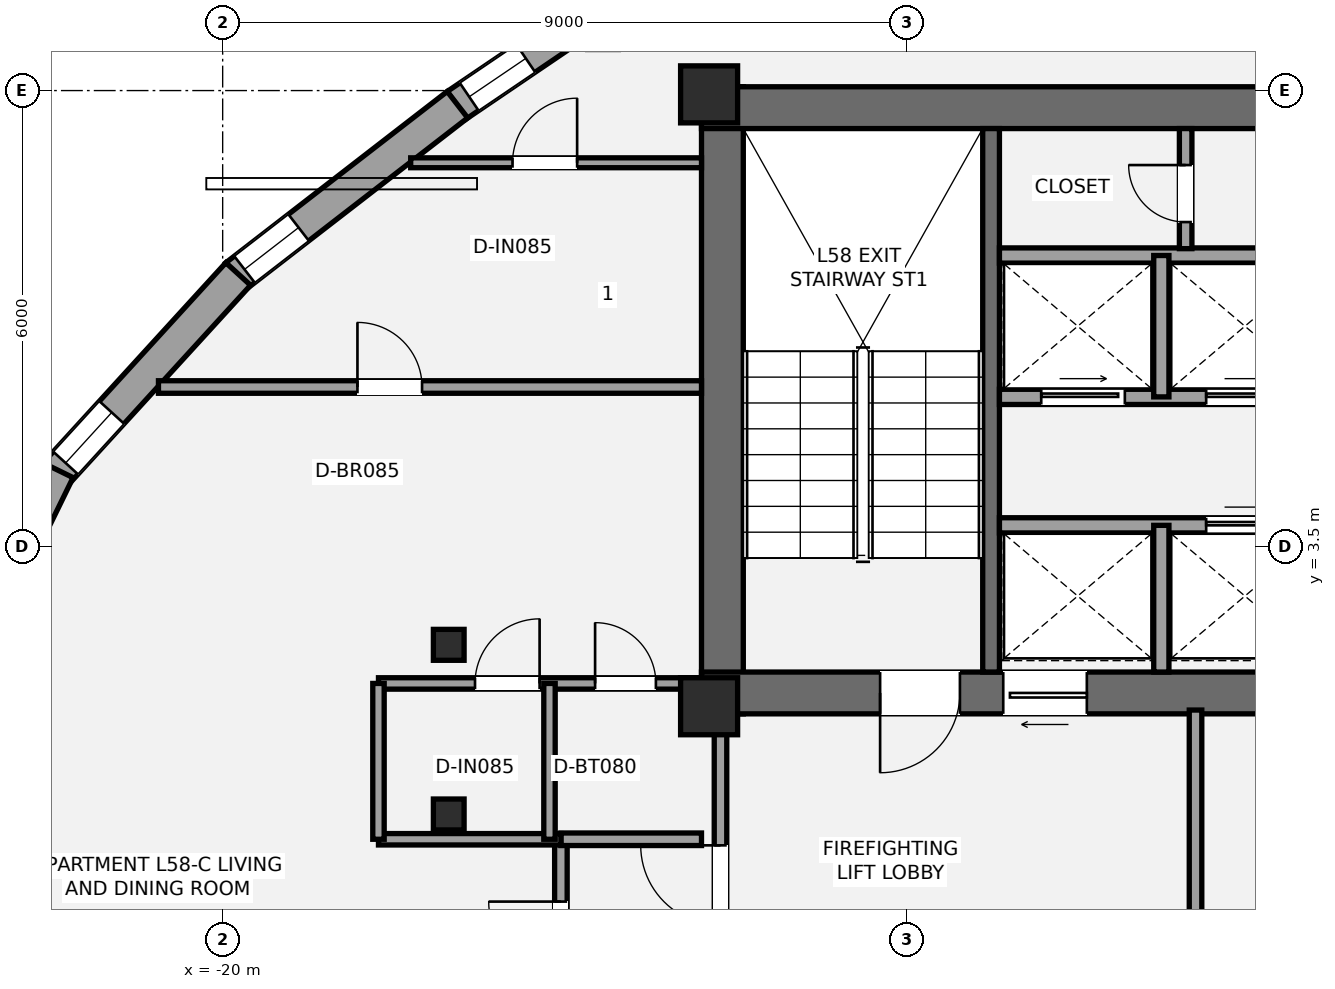
"""IFC4 building model, lengths in metres.
Left out: names, types, materials, properties, quantities, classifications, styles, units other than length and angle.
Written with IfcOpenShell. Run it as: python <this file> out.ifc"""

import sys

from ifc_helpers import new_model, si_unit, direction, frame, frame_2d, origin, origin_2d, place, context, subcontext, project, spatial, rectangle, i_section, extrude, element, fill, save


model = new_model("IFC4")
c1 = context("Model", 3, precision=1e-05, world=origin(), true_north=direction((0.0, 1.0)))
c2 = subcontext(c1, "Body", "Model", "MODEL_VIEW")
j1 = project(units=[si_unit("LENGTHUNIT", "METRE"), si_unit("PLANEANGLEUNIT", "RADIAN")], contexts=[c1])
p1 = place(None, origin())
s1 = spatial("IfcSite", under=j1, at=p1, CompositionType="ELEMENT")
p2 = place(p1, origin())
s2 = spatial("IfcBuilding", under=s1, at=p2, CompositionType="ELEMENT")
p3 = place(p2, frame((0.0, 0.0, 210.0)))
s3 = spatial("IfcBuildingStorey", under=s2, at=p3, CompositionType="ELEMENT", Elevation=210.0)
p4 = place(p3, frame((-13.425, 1.3, 0.0), z_axis=(0.0, 0.0, 1.0), x_axis=(0.0, 1.0, 0.0)))
e1 = element("IfcWall", 1, at=p4, inside=s3, PredefinedType="SHEAR", context=c2, shape_type="SweptSolid", body=[
    extrude(rectangle(XDim=8.25, YDim=0.55, at=frame_2d((4.125, 0.0))), origin(), (0.0, 0.0, 1.0), 3.15),
])
p5 = place(p3, frame((-13.7, 9.275, 0.0), z_axis=(0.0, 0.0, 1.0), x_axis=(1.0, 0.0, 0.0)))
e2 = element("IfcWall", 2, at=p5, inside=s3, PredefinedType="SHEAR", context=c2, shape_type="SweptSolid", body=[
    extrude(rectangle(XDim=9.175, YDim=0.55, at=frame_2d((4.587, 0.0))), origin(), (0.0, 0.0, 1.0), 3.15),
])
p6 = place(p3, frame((-4.925, 1.575, 0.0), z_axis=(0.0, 0.0, 1.0), x_axis=(-1.0, 0.0, 0.0)))
e3 = element("IfcWall", 3, at=p6, inside=s3, PredefinedType="SHEAR", context=c2, shape_type="SweptSolid", body=[
    extrude(rectangle(XDim=8.775, YDim=0.55, at=frame_2d((4.387, 0.0))), origin(), (0.0, 0.0, 1.0), 3.15),
])
p7 = place(p6, frame((5.375, 0.0, 0.0)))
e4 = element("IfcOpeningElement", 4, at=p7, cuts=e3, PredefinedType="OPENING", context=c2, shape_type="SweptSolid", body=[
    extrude(rectangle(XDim=1.05, YDim=2.15, at=frame_2d((0.525, 1.075))), frame((0.0, 0.285, 0.0), z_axis=(0.0, -1.0, 0.0), x_axis=(1.0, 0.0, 0.0)), (0.0, 0.0, 1.0), 0.57),
])
p8 = place(p6, frame((3.705, 0.0, 0.0)))
e5 = element("IfcOpeningElement", 5, at=p8, cuts=e3, PredefinedType="OPENING", context=c2, shape_type="SweptSolid", body=[
    extrude(rectangle(XDim=1.1, YDim=2.2, at=frame_2d((0.55, 1.1))), frame((0.0, 0.285, 0.0), z_axis=(0.0, -1.0, 0.0), x_axis=(1.0, 0.0, 0.0)), (0.0, 0.0, 1.0), 0.57),
])
p9 = place(p3, frame((-9.89, 1.85, 0.0), z_axis=(0.0, 0.0, 1.0), x_axis=(0.0, 1.0, 0.0)))
e6 = element("IfcWall", 6, at=p9, inside=s3, PredefinedType="SHEAR", context=c2, shape_type="SweptSolid", body=[
    extrude(rectangle(XDim=7.15, YDim=0.22, at=frame_2d((3.575, 0.0))), origin(), (0.0, 0.0, 1.0), 3.15),
])
for number, where, z_axis, x_axis in (
    (7, (-13.6, 1.4, 0.0), (0.0, 0.0, 1.0), (1.0, 0.0, 0.0)),
    (8, (-13.6, 9.45, 0.0), (0.0, 0.0, 1.0), (1.0, 0.0, 0.0)),
):
    element("IfcColumn", number, at=place(p3, frame(where, z_axis=z_axis, x_axis=x_axis)), inside=s3, PredefinedType="PILASTER", context=c2, shape_type="SweptSolid", body=[
        extrude(rectangle(XDim=0.75, YDim=0.75, at=origin_2d()), origin(), (0.0, 0.0, 1.0), 3.15),
    ])
for number, where, z_axis, x_axis in (
    (9, (-17.026, 2.208, 0.0), (0.0, 0.0, 1.0), (1.0, 0.0, 0.0)),
    (10, (-17.026, -0.024, 0.0), (0.0, 0.0, 1.0), (1.0, 0.0, 0.0)),
):
    element("IfcColumn", number, at=place(p3, frame(where, z_axis=z_axis, x_axis=x_axis)), inside=s3, PredefinedType="COLUMN", context=c2, shape_type="SweptSolid", body=[
        extrude(i_section(OverallWidth=0.404, OverallDepth=0.407, WebThickness=0.027, FlangeThickness=0.044, at=origin_2d()), origin(), (0.0, 0.0, 1.0), 3.15),
    ])
p10 = place(p3, frame((-16.922, 9.306, 0.0), z_axis=(0.0, 0.0, 1.0), x_axis=(0.827589832786, 0.561333295529, 0.0)))
e11 = element("IfcWall", 11, at=p10, inside=s3, PredefinedType="STANDARD", context=c2, shape_type="SweptSolid", body=[
    extrude(rectangle(XDim=3.693, YDim=0.44, at=frame_2d((1.847, 0.0))), origin(), (0.0, 0.0, 1.0), 2.336),
])
p11 = place(p10, frame((0.2, 0.0, 0.42)))
e12 = element("IfcOpeningElement", 12, at=p11, cuts=e11, PredefinedType="OPENING", context=c2, shape_type="SweptSolid", body=[
    extrude(rectangle(XDim=0.9, YDim=1.35, at=frame_2d((0.45, 0.675))), frame((0.0, 0.23, 0.0), z_axis=(0.0, -1.0, 0.0), x_axis=(1.0, 0.0, 0.0)), (0.0, 0.0, 1.0), 0.46),
])
p12 = place(p3, frame((-19.823, 7.062, 0.0), z_axis=(0.0, 0.0, 1.0), x_axis=(0.791016617957, 0.61179466336, 0.0)))
e13 = element("IfcWall", 13, at=p12, inside=s3, PredefinedType="STANDARD", context=c2, shape_type="SweptSolid", body=[
    extrude(rectangle(XDim=3.682, YDim=0.44, at=frame_2d((1.841, 0.0))), origin(), (0.0, 0.0, 1.0), 2.336),
])
p13 = place(p12, frame((0.14, 0.0, 0.58)))
e14 = element("IfcOpeningElement", 14, at=p13, cuts=e13, PredefinedType="OPENING", context=c2, shape_type="SweptSolid", body=[
    extrude(rectangle(XDim=0.9, YDim=1.35, at=frame_2d((0.45, 0.675))), frame((0.0, 0.23, 0.0), z_axis=(0.0, -1.0, 0.0), x_axis=(1.0, 0.0, 0.0)), (0.0, 0.0, 1.0), 0.46),
])
p14 = place(p3, frame((-22.201, 4.453, 0.0), z_axis=(0.0, 0.0, 1.0), x_axis=(0.674353738675, 0.738408447362, 0.0)))
e15 = element("IfcWall", 15, at=p14, inside=s3, PredefinedType="STANDARD", context=c2, shape_type="SweptSolid", body=[
    extrude(rectangle(XDim=3.568, YDim=0.44, at=frame_2d((1.784, 0.0))), origin(), (0.0, 0.0, 1.0), 2.336),
])
p15 = place(p14, frame((0.2, 0.0, 0.42)))
e16 = element("IfcOpeningElement", 16, at=p15, cuts=e15, PredefinedType="OPENING", context=c2, shape_type="SweptSolid", body=[
    extrude(rectangle(XDim=0.9, YDim=1.35, at=frame_2d((0.45, 0.675))), frame((0.0, 0.23, 0.0), z_axis=(0.0, -1.0, 0.0), x_axis=(1.0, 0.0, 0.0)), (0.0, 0.0, 1.0), 0.46),
])
p16 = place(p3, frame((-23.636, 1.496, 0.0), z_axis=(0.0, 0.0, 1.0), x_axis=(0.439000922584, 0.898486610902, 0.0)))
e17 = element("IfcWall", 17, at=p16, inside=s3, PredefinedType="STANDARD", context=c2, shape_type="SweptSolid", body=[
    extrude(rectangle(XDim=3.349, YDim=0.44, at=frame_2d((1.675, 0.0))), origin(), (0.0, 0.0, 1.0), 2.336),
])
p17 = place(p3, frame((-13.45, -2.15, 0.0), z_axis=(0.0, 0.0, 1.0), x_axis=(0.0, 1.0, 0.0)))
e18 = element("IfcWall", 18, at=p17, inside=s3, PredefinedType="PARTITIONING", context=c2, shape_type="SweptSolid", body=[
    extrude(rectangle(XDim=3.5, YDim=0.165, at=frame_2d((1.75, 0.0))), origin(), (0.0, 0.0, 1.0), 2.423),
])
p18 = place(p17, frame((0.67, 0.0, 0.0)))
e19 = element("IfcOpeningElement", 19, at=p18, cuts=e18, PredefinedType="OPENING", context=c2, shape_type="SweptSolid", body=[
    extrude(rectangle(XDim=1.05, YDim=2.15, at=frame_2d((0.525, 1.075))), frame((0.0, 0.093, 0.0), z_axis=(0.0, -1.0, 0.0), x_axis=(1.0, 0.0, 0.0)), (0.0, 0.0, 1.0), 0.185),
])
p19 = place(p3, frame((-7.2, -2.15, 0.0), z_axis=(0.0, 0.0, 1.0), x_axis=(0.0, 1.0, 0.0)))
e20 = element("IfcWall", 20, at=p19, inside=s3, PredefinedType="PARTITIONING", context=c2, shape_type="SweptSolid", body=[
    extrude(rectangle(XDim=3.5, YDim=0.165, at=frame_2d((1.75, 0.0))), origin(), (0.0, 0.0, 1.0), 2.423),
])
p20 = place(p3, frame((-9.78, 3.78, 0.0), z_axis=(0.0, 0.0, 1.0), x_axis=(1.0, 0.0, 0.0)))
e21 = element("IfcWall", 21, at=p20, inside=s3, PredefinedType="SOLIDWALL", context=c2, shape_type="SweptSolid", body=[
    extrude(rectangle(XDim=4.305, YDim=0.2, at=frame_2d((2.152, 0.0))), origin(), (0.0, 0.0, 1.0), 2.97),
])
p21 = place(p20, frame((2.72, 0.0, 0.0)))
e22 = element("IfcOpeningElement", 22, at=p21, cuts=e21, PredefinedType="OPENING", context=c2, shape_type="SweptSolid", body=[
    extrude(rectangle(XDim=1.1, YDim=2.2, at=frame_2d((0.55, 1.1))), frame((0.0, 0.11, 0.0), z_axis=(0.0, -1.0, 0.0), x_axis=(1.0, 0.0, 0.0)), (0.0, 0.0, 1.0), 0.22),
])
p22 = place(p3, frame((-7.65, 1.85, 0.0), z_axis=(0.0, 0.0, 1.0), x_axis=(0.0, 1.0, 0.0)))
e23 = element("IfcWall", 23, at=p22, inside=s3, PredefinedType="SOLIDWALL", context=c2, shape_type="SweptSolid", body=[
    extrude(rectangle(XDim=1.93, YDim=0.2, at=frame_2d((0.965, 0.0))), origin(), (0.0, 0.0, 1.0), 2.97),
])
p23 = place(p3, frame((-9.78, 5.47, 0.0), z_axis=(0.0, 0.0, 1.0), x_axis=(1.0, 0.0, 0.0)))
e24 = element("IfcWall", 24, at=p23, inside=s3, PredefinedType="SOLIDWALL", context=c2, shape_type="SweptSolid", body=[
    extrude(rectangle(XDim=4.305, YDim=0.2, at=frame_2d((2.152, 0.0))), origin(), (0.0, 0.0, 1.0), 2.97),
])
p24 = place(p23, frame((0.55, 0.0, 0.0)))
e25 = element("IfcOpeningElement", 25, at=p24, cuts=e24, PredefinedType="OPENING", context=c2, shape_type="SweptSolid", body=[
    extrude(rectangle(XDim=1.1, YDim=2.2, at=frame_2d((0.55, 1.1))), frame((0.0, 0.11, 0.0), z_axis=(0.0, -1.0, 0.0), x_axis=(1.0, 0.0, 0.0)), (0.0, 0.0, 1.0), 0.22),
])
p25 = place(p23, frame((2.72, 0.0, 0.0)))
e26 = element("IfcOpeningElement", 26, at=p25, cuts=e24, PredefinedType="OPENING", context=c2, shape_type="SweptSolid", body=[
    extrude(rectangle(XDim=1.1, YDim=2.2, at=frame_2d((0.55, 1.1))), frame((0.0, 0.11, 0.0), z_axis=(0.0, -1.0, 0.0), x_axis=(1.0, 0.0, 0.0)), (0.0, 0.0, 1.0), 0.22),
])
p26 = place(p3, frame((-9.78, 7.33, 0.0), z_axis=(0.0, 0.0, 1.0), x_axis=(1.0, 0.0, 0.0)))
e27 = element("IfcWall", 27, at=p26, inside=s3, PredefinedType="SOLIDWALL", context=c2, shape_type="SweptSolid", body=[
    extrude(rectangle(XDim=4.305, YDim=0.2, at=frame_2d((2.152, 0.0))), origin(), (0.0, 0.0, 1.0), 2.97),
])
p27 = place(p3, frame((-7.65, 5.47, 0.0), z_axis=(0.0, 0.0, 1.0), x_axis=(0.0, 1.0, 0.0)))
e28 = element("IfcWall", 28, at=p27, inside=s3, PredefinedType="SOLIDWALL", context=c2, shape_type="SweptSolid", body=[
    extrude(rectangle(XDim=1.86, YDim=0.2, at=frame_2d((0.93, 0.0))), origin(), (0.0, 0.0, 1.0), 2.97),
])
p28 = place(p3, frame((-7.33, 7.42, 0.0), z_axis=(0.0, 0.0, 1.0), x_axis=(0.0, 1.0, 0.0)))
e29 = element("IfcWall", 29, at=p28, inside=s3, PredefinedType="PARTITIONING", context=c2, shape_type="SweptSolid", body=[
    extrude(rectangle(XDim=1.58, YDim=0.165, at=frame_2d((0.79, 0.0))), origin(), (0.0, 0.0, 1.0), 2.97),
])
p29 = place(p28, frame((0.35, 0.0, 0.0)))
e30 = element("IfcOpeningElement", 30, at=p29, cuts=e29, PredefinedType="OPENING", context=c2, shape_type="SweptSolid", body=[
    extrude(rectangle(XDim=0.75, YDim=2.1, at=frame_2d((0.375, 1.05))), frame((0.0, 0.093, 0.0), z_axis=(0.0, -1.0, 0.0), x_axis=(1.0, 0.0, 0.0)), (0.0, 0.0, 1.0), 0.185),
])
p30 = place(p3, frame((-15.55, -3.95, 0.0), z_axis=(0.0, 0.0, 1.0), x_axis=(0.0, 1.0, 0.0)))
e31 = element("IfcWall", 31, at=p30, inside=s3, PredefinedType="PARTITIONING", context=c2, shape_type="SweptSolid", body=[
    extrude(rectangle(XDim=3.6, YDim=0.165, at=frame_2d((1.8, 0.0))), origin(), (0.0, 0.0, 1.0), 2.357),
])
p31 = place(p30, frame((1.83, 0.0, 0.0)))
e32 = element("IfcOpeningElement", 32, at=p31, cuts=e31, PredefinedType="OPENING", context=c2, shape_type="SweptSolid", body=[
    extrude(rectangle(XDim=0.95, YDim=2.15, at=frame_2d((0.475, 1.075))), frame((0.0, 0.093, 0.0), z_axis=(0.0, -1.0, 0.0), x_axis=(1.0, 0.0, 0.0)), (0.0, 0.0, 1.0), 0.185),
])
p32 = place(p3, frame((-15.55, -0.35, 0.0), z_axis=(0.0, 0.0, 1.0), x_axis=(1.0, 0.0, 0.0)))
e33 = element("IfcWall", 33, at=p32, inside=s3, PredefinedType="PARTITIONING", context=c2, shape_type="SweptSolid", body=[
    extrude(rectangle(XDim=1.85, YDim=0.165, at=frame_2d((0.925, 0.0))), origin(), (0.0, 0.0, 1.0), 2.97),
])
p33 = place(p3, frame((-20.845, 5.6, 0.0), z_axis=(0.0, 0.0, 1.0), x_axis=(1.0, 0.0, 0.0)))
e34 = element("IfcWall", 34, at=p33, inside=s3, PredefinedType="PARTITIONING", context=c2, shape_type="SweptSolid", body=[
    extrude(rectangle(XDim=7.145, YDim=0.165, at=frame_2d((3.572, 0.0))), origin(), (0.0, 0.0, 1.0), 2.423),
])
p34 = place(p33, frame((2.618, 0.0, 0.0)))
e35 = element("IfcOpeningElement", 35, at=p34, cuts=e34, PredefinedType="OPENING", context=c2, shape_type="SweptSolid", body=[
    extrude(rectangle(XDim=0.85, YDim=2.1, at=frame_2d((0.425, 1.05))), frame((0.0, 0.093, 0.0), z_axis=(0.0, -1.0, 0.0), x_axis=(1.0, 0.0, 0.0)), (0.0, 0.0, 1.0), 0.185),
])
p35 = place(p3, frame((-17.95, 1.7, 0.0), z_axis=(0.0, 0.0, 1.0), x_axis=(1.0, 0.0, 0.0)))
e36 = element("IfcWall", 36, at=p35, inside=s3, PredefinedType="PLUMBINGWALL", context=c2, shape_type="SweptSolid", body=[
    extrude(rectangle(XDim=4.25, YDim=0.15, at=frame_2d((2.125, 0.0))), origin(), (0.0, 0.0, 1.0), 2.423),
])
p36 = place(p35, frame((2.85, 0.0, 0.0)))
e37 = element("IfcOpeningElement", 37, at=p36, cuts=e36, PredefinedType="OPENING", context=c2, shape_type="SweptSolid", body=[
    extrude(rectangle(XDim=0.8, YDim=2.1, at=frame_2d((0.4, 1.05))), frame((0.0, 0.085, 0.0), z_axis=(0.0, -1.0, 0.0), x_axis=(1.0, 0.0, 0.0)), (0.0, 0.0, 1.0), 0.17),
])
p37 = place(p35, frame((1.27, 0.0, 0.0)))
e38 = element("IfcOpeningElement", 38, at=p37, cuts=e36, PredefinedType="OPENING", context=c2, shape_type="SweptSolid", body=[
    extrude(rectangle(XDim=0.85, YDim=2.1, at=frame_2d((0.425, 1.05))), frame((0.0, 0.085, 0.0), z_axis=(0.0, -1.0, 0.0), x_axis=(1.0, 0.0, 0.0)), (0.0, 0.0, 1.0), 0.17),
])
p38 = place(p3, frame((-17.95, -0.35, 0.0), z_axis=(0.0, 0.0, 1.0), x_axis=(1.0, 0.0, 0.0)))
e39 = element("IfcWall", 39, at=p38, inside=s3, PredefinedType="PLUMBINGWALL", context=c2, shape_type="SweptSolid", body=[
    extrude(rectangle(XDim=2.4, YDim=0.15, at=frame_2d((1.2, 0.0))), origin(), (0.0, 0.0, 1.0), 2.423),
])
p39 = place(p3, frame((-15.7, -0.35, 0.0), z_axis=(0.0, 0.0, 1.0), x_axis=(0.0, 1.0, 0.0)))
e40 = element("IfcWall", 40, at=p39, inside=s3, PredefinedType="PLUMBINGWALL", context=c2, shape_type="SweptSolid", body=[
    extrude(rectangle(XDim=2.05, YDim=0.15, at=frame_2d((1.025, 0.0))), origin(), (0.0, 0.0, 1.0), 2.97),
])
p40 = place(p3, frame((-17.95, -0.35, 0.0), z_axis=(0.0, 0.0, 1.0), x_axis=(0.0, 1.0, 0.0)))
e41 = element("IfcWall", 41, at=p40, inside=s3, PredefinedType="PLUMBINGWALL", context=c2, shape_type="SweptSolid", body=[
    extrude(rectangle(XDim=2.05, YDim=0.15, at=frame_2d((1.025, 0.0))), origin(), (0.0, 0.0, 1.0), 2.423),
])
p41 = place(p3, frame((-17.526, 8.55, 0.0), z_axis=(0.0, 0.0, 1.0), x_axis=(1.0, 0.0, 0.0)))
e42 = element("IfcWall", 42, at=p41, inside=s3, PredefinedType="PARTITIONING", context=c2, shape_type="SweptSolid", body=[
    extrude(rectangle(XDim=3.826, YDim=0.13, at=frame_2d((1.913, 0.0))), origin(), (0.0, 0.0, 1.0), 2.423),
])
p42 = place(p41, frame((1.34, 0.0, 0.0)))
e43 = element("IfcOpeningElement", 43, at=p42, cuts=e42, PredefinedType="OPENING", context=c2, shape_type="SweptSolid", body=[
    extrude(rectangle(XDim=0.85, YDim=2.1, at=frame_2d((0.425, 1.05))), frame((0.0, 0.075, 0.0), z_axis=(0.0, -1.0, 0.0), x_axis=(1.0, 0.0, 0.0)), (0.0, 0.0, 1.0), 0.15),
])
p43 = place(p11, origin())
e44 = element("IfcWindow", 44, at=p43, inside=s3, PartitioningType="SINGLE_PANEL", PredefinedType="WINDOW", context=c2, shape_type="SweptSolid", body=[
    extrude(rectangle(XDim=0.9, YDim=1.35, at=frame_2d((0.45, 0.675))), frame((0.0, -0.01, 0.0), z_axis=(0.0, -1.0, 0.0), x_axis=(1.0, 0.0, 0.0)), (0.0, 0.0, 1.0), 0.06),
])
fill(e12, e44)
p44 = place(p15, origin())
e45 = element("IfcWindow", 45, at=p44, inside=s3, PartitioningType="SINGLE_PANEL", PredefinedType="WINDOW", context=c2, shape_type="SweptSolid", body=[
    extrude(rectangle(XDim=0.9, YDim=1.35, at=frame_2d((0.45, 0.675))), frame((0.0, -0.01, 0.0), z_axis=(0.0, -1.0, 0.0), x_axis=(1.0, 0.0, 0.0)), (0.0, 0.0, 1.0), 0.06),
])
fill(e16, e45)
p45 = place(p13, origin())
e46 = element("IfcWindow", 46, at=p45, inside=s3, PartitioningType="SINGLE_PANEL", PredefinedType="WINDOW", context=c2, shape_type="SweptSolid", body=[
    extrude(rectangle(XDim=0.9, YDim=1.35, at=frame_2d((0.45, 0.675))), frame((0.0, -0.01, 0.0), z_axis=(0.0, -1.0, 0.0), x_axis=(1.0, 0.0, 0.0)), (0.0, 0.0, 1.0), 0.06),
])
fill(e14, e46)
p46 = place(p7, origin())
e47 = element("IfcDoor", 47, at=p46, inside=s3, OperationType="SINGLE_SWING_RIGHT", PredefinedType="DOOR", context=c2, shape_type="SweptSolid", body=[
    extrude(rectangle(XDim=1.05, YDim=2.15, at=frame_2d((0.525, 1.075))), frame((0.0, 0.025, 0.0), z_axis=(0.0, -1.0, 0.0), x_axis=(1.0, 0.0, 0.0)), (0.0, 0.0, 1.0), 0.05),
])
fill(e4, e47)
p47 = place(p18, origin())
e48 = element("IfcDoor", 48, at=p47, inside=s3, OperationType="SINGLE_SWING_RIGHT", PredefinedType="DOOR", context=c2, shape_type="SweptSolid", body=[
    extrude(rectangle(XDim=1.05, YDim=2.15, at=frame_2d((0.525, 1.075))), frame((0.0, 0.025, 0.0), z_axis=(0.0, -1.0, 0.0), x_axis=(1.0, 0.0, 0.0)), (0.0, 0.0, 1.0), 0.05),
])
fill(e19, e48)
p48 = place(p8, origin())
e49 = element("IfcDoor", 49, at=p48, inside=s3, OperationType="SLIDING_TO_LEFT", PredefinedType="DOOR", context=c2, shape_type="SweptSolid", body=[
    extrude(rectangle(XDim=1.1, YDim=2.2, at=frame_2d((0.55, 1.1))), frame((0.0, 0.025, 0.0), z_axis=(0.0, -1.0, 0.0), x_axis=(1.0, 0.0, 0.0)), (0.0, 0.0, 1.0), 0.05),
])
fill(e5, e49)
p49 = place(p24, origin())
e50 = element("IfcDoor", 50, at=p49, inside=s3, OperationType="SLIDING_TO_LEFT", PredefinedType="DOOR", context=c2, shape_type="SweptSolid", body=[
    extrude(rectangle(XDim=1.1, YDim=2.2, at=frame_2d((0.55, 1.1))), frame((0.0, 0.025, 0.0), z_axis=(0.0, -1.0, 0.0), x_axis=(1.0, 0.0, 0.0)), (0.0, 0.0, 1.0), 0.05),
])
fill(e25, e50)
p50 = place(p25, origin())
e51 = element("IfcDoor", 51, at=p50, inside=s3, OperationType="SLIDING_TO_LEFT", PredefinedType="DOOR", context=c2, shape_type="SweptSolid", body=[
    extrude(rectangle(XDim=1.1, YDim=2.2, at=frame_2d((0.55, 1.1))), frame((0.0, 0.025, 0.0), z_axis=(0.0, -1.0, 0.0), x_axis=(1.0, 0.0, 0.0)), (0.0, 0.0, 1.0), 0.05),
])
fill(e26, e51)
p51 = place(p21, origin())
e52 = element("IfcDoor", 52, at=p51, inside=s3, OperationType="SLIDING_TO_LEFT", PredefinedType="DOOR", context=c2, shape_type="SweptSolid", body=[
    extrude(rectangle(XDim=1.1, YDim=2.2, at=frame_2d((0.55, 1.1))), frame((0.0, 0.025, 0.0), z_axis=(0.0, -1.0, 0.0), x_axis=(1.0, 0.0, 0.0)), (0.0, 0.0, 1.0), 0.05),
])
fill(e22, e52)
p52 = place(p29, origin())
e53 = element("IfcDoor", 53, at=p52, inside=s3, OperationType="SINGLE_SWING_RIGHT", PredefinedType="DOOR", context=c2, shape_type="SweptSolid", body=[
    extrude(rectangle(XDim=0.75, YDim=2.1, at=frame_2d((0.375, 1.05))), frame((0.0, 0.025, 0.0), z_axis=(0.0, -1.0, 0.0), x_axis=(1.0, 0.0, 0.0)), (0.0, 0.0, 1.0), 0.05),
])
fill(e30, e53)
p53 = place(p31, origin())
e54 = element("IfcDoor", 54, at=p53, inside=s3, OperationType="SINGLE_SWING_RIGHT", PredefinedType="DOOR", context=c2, shape_type="SweptSolid", body=[
    extrude(rectangle(XDim=0.95, YDim=2.15, at=frame_2d((0.475, 1.075))), frame((0.0, 0.025, 0.0), z_axis=(0.0, -1.0, 0.0), x_axis=(1.0, 0.0, 0.0)), (0.0, 0.0, 1.0), 0.05),
])
fill(e32, e54)
p54 = place(p36, origin())
e55 = element("IfcDoor", 55, at=p54, inside=s3, OperationType="SINGLE_SWING_LEFT", PredefinedType="DOOR", context=c2, shape_type="SweptSolid", body=[
    extrude(rectangle(XDim=0.8, YDim=2.1, at=frame_2d((0.4, 1.05))), frame((0.0, 0.025, 0.0), z_axis=(0.0, -1.0, 0.0), x_axis=(1.0, 0.0, 0.0)), (0.0, 0.0, 1.0), 0.05),
])
fill(e37, e55)
p55 = place(p37, origin())
e56 = element("IfcDoor", 56, at=p55, inside=s3, OperationType="SINGLE_SWING_RIGHT", PredefinedType="DOOR", context=c2, shape_type="SweptSolid", body=[
    extrude(rectangle(XDim=0.85, YDim=2.1, at=frame_2d((0.425, 1.05))), frame((0.0, 0.025, 0.0), z_axis=(0.0, -1.0, 0.0), x_axis=(1.0, 0.0, 0.0)), (0.0, 0.0, 1.0), 0.05),
])
fill(e38, e56)
p56 = place(p34, origin())
e57 = element("IfcDoor", 57, at=p56, inside=s3, OperationType="SINGLE_SWING_LEFT", PredefinedType="DOOR", context=c2, shape_type="SweptSolid", body=[
    extrude(rectangle(XDim=0.85, YDim=2.1, at=frame_2d((0.425, 1.05))), frame((0.0, 0.025, 0.0), z_axis=(0.0, -1.0, 0.0), x_axis=(1.0, 0.0, 0.0)), (0.0, 0.0, 1.0), 0.05),
])
fill(e35, e57)
p57 = place(p42, origin())
e58 = element("IfcDoor", 58, at=p57, inside=s3, OperationType="SINGLE_SWING_RIGHT", PredefinedType="DOOR", context=c2, shape_type="SweptSolid", body=[
    extrude(rectangle(XDim=0.85, YDim=2.1, at=frame_2d((0.425, 1.05))), frame((0.0, 0.025, 0.0), z_axis=(0.0, -1.0, 0.0), x_axis=(1.0, 0.0, 0.0)), (0.0, 0.0, 1.0), 0.05),
])
fill(e43, e58)
save(model, sys.argv[1])
